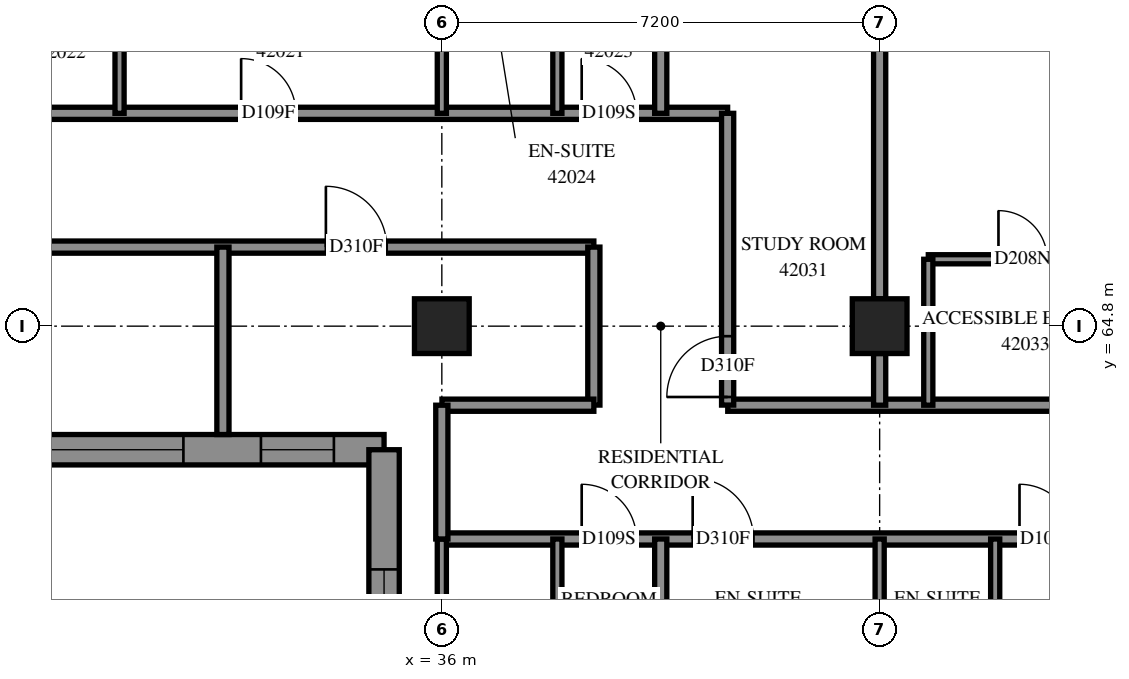
"""IFC4 building model, lengths in metres.
Left out: names, types, materials, properties, quantities, classifications, styles, units other than length and angle.
Written with IfcOpenShell. Run it as: python <this file> out.ifc"""

import sys

from ifc_helpers import new_model, si_unit, direction, frame, frame_2d, origin, origin_2d, place, context, subcontext, project, spatial, polyline, rectangle, outline, extrude, element, fill, save


model = new_model("IFC4")
c1 = context("Model", 3, precision=1e-05, world=origin(), true_north=direction((0.0, 1.0)))
c2 = subcontext(c1, "Body", "Model", "MODEL_VIEW")
j1 = project(units=[si_unit("LENGTHUNIT", "METRE"), si_unit("PLANEANGLEUNIT", "RADIAN")], contexts=[c1])
p1 = place(None, origin())
s1 = spatial("IfcSite", under=j1, at=p1, CompositionType="ELEMENT")
p2 = place(p1, origin())
s2 = spatial("IfcBuilding", under=s1, at=p2, CompositionType="ELEMENT")
p3 = place(p2, frame((0.0, 0.0, 155.8)))
s3 = spatial("IfcBuildingStorey", under=s2, at=p3, CompositionType="ELEMENT", Elevation=155.8)
for number, where, z_axis, x_axis in (
    (1, (36.0, 64.8, 0.0), (0.0, 0.0, 1.0), (1.0, 0.0, 0.0)),
    (2, (43.2, 64.8, 0.0), (0.0, 0.0, 1.0), (1.0, 0.0, 0.0)),
):
    element("IfcColumn", number, at=place(p3, frame(where, z_axis=z_axis, x_axis=x_axis)), inside=s3, PredefinedType="COLUMN", context=c2, shape_type="SweptSolid", body=[
        extrude(rectangle(XDim=0.9, YDim=0.9, at=origin_2d()), origin(), (0.0, 0.0, 1.0), 3.1),
    ])
p4 = place(p3, frame((19.568, 62.768, 0.0), z_axis=(0.0, 0.0, 1.0), x_axis=(1.0, 0.0, 0.0)))
e3 = element("IfcWall", 3, at=p4, inside=s3, PredefinedType="SOLIDWALL", context=c2, shape_type="SweptSolid", body=[
    extrude(outline(polyline([(-0.25, -0.25), (15.232, -0.25), (15.732, 0.25), (0.25, 0.25), (-0.25, -0.25)])), origin(), (0.0, 0.0, 1.0), 3.1),
])
p5 = place(p4, frame((2.432, 0.0, 0.45)))
e4 = element("IfcOpeningElement", 4, at=p5, cuts=e3, PredefinedType="OPENING", context=c2, shape_type="SweptSolid", body=[
    extrude(rectangle(XDim=2.8, YDim=2.5, at=frame_2d((1.4, 1.25))), frame((0.0, 0.26, 0.0), z_axis=(0.0, -1.0, 0.0), x_axis=(1.0, 0.0, 0.0)), (0.0, 0.0, 1.0), 0.52),
])
p6 = place(p4, frame((6.032, 0.0, 0.45)))
e5 = element("IfcOpeningElement", 5, at=p6, cuts=e3, PredefinedType="OPENING", context=c2, shape_type="SweptSolid", body=[
    extrude(rectangle(XDim=2.8, YDim=2.5, at=frame_2d((1.4, 1.25))), frame((0.0, 0.26, 0.0), z_axis=(0.0, -1.0, 0.0), x_axis=(1.0, 0.0, 0.0)), (0.0, 0.0, 1.0), 0.52),
])
p7 = place(p4, frame((9.382, 0.0, 0.45)))
e6 = element("IfcOpeningElement", 6, at=p7, cuts=e3, PredefinedType="OPENING", context=c2, shape_type="SweptSolid", body=[
    extrude(rectangle(XDim=2.8, YDim=2.5, at=frame_2d((1.4, 1.25))), frame((0.0, 0.26, 0.0), z_axis=(0.0, -1.0, 0.0), x_axis=(1.0, 0.0, 0.0)), (0.0, 0.0, 1.0), 0.52),
])
p8 = place(p4, frame((0.641, 0.0, 0.45)))
e7 = element("IfcOpeningElement", 7, at=p8, cuts=e3, PredefinedType="OPENING", context=c2, shape_type="SweptSolid", body=[
    extrude(rectangle(XDim=1.2, YDim=2.5, at=frame_2d((0.6, 1.25))), frame((0.0, 0.26, 0.0), z_axis=(0.0, -1.0, 0.0), x_axis=(1.0, 0.0, 0.0)), (0.0, 0.0, 1.0), 0.52),
])
p9 = place(p4, frame((13.457, 0.0, 0.45)))
e8 = element("IfcOpeningElement", 8, at=p9, cuts=e3, PredefinedType="OPENING", context=c2, shape_type="SweptSolid", body=[
    extrude(rectangle(XDim=1.2, YDim=2.5, at=frame_2d((0.6, 1.25))), frame((0.0, 0.26, 0.0), z_axis=(0.0, -1.0, 0.0), x_axis=(1.0, 0.0, 0.0)), (0.0, 0.0, 1.0), 0.52),
])
p10 = place(p3, frame((35.05, 62.768, 0.0), z_axis=(0.0, 0.0, 1.0), x_axis=(0.0, -1.0, 0.0)))
e9 = element("IfcWall", 9, at=p10, inside=s3, PredefinedType="SOLIDWALL", context=c2, shape_type="SweptSolid", body=[
    extrude(outline(polyline([(0.25, -0.25), (6.368, -0.25), (5.868, 0.25), (-0.25, 0.25), (0.25, -0.25)])), origin(), (0.0, 0.0, 1.0), 3.1),
])
p11 = place(p10, frame((1.968, 0.0, 0.7)))
e10 = element("IfcOpeningElement", 10, at=p11, cuts=e9, PredefinedType="OPENING", context=c2, shape_type="SweptSolid", body=[
    extrude(rectangle(XDim=1.8, YDim=2.2, at=frame_2d((0.9, 1.1))), frame((0.0, 0.26, 0.0), z_axis=(0.0, -1.0, 0.0), x_axis=(1.0, 0.0, 0.0)), (0.0, 0.0, 1.0), 0.52),
])
p12 = place(p10, frame((3.968, 0.0, 0.45)))
e11 = element("IfcOpeningElement", 11, at=p12, cuts=e9, PredefinedType="OPENING", context=c2, shape_type="SweptSolid", body=[
    extrude(rectangle(XDim=0.8, YDim=2.5, at=frame_2d((0.4, 1.25))), frame((0.0, 0.26, 0.0), z_axis=(0.0, -1.0, 0.0), x_axis=(1.0, 0.0, 0.0)), (0.0, 0.0, 1.0), 0.52),
])
p13 = place(p3, frame((21.6, 68.3, 0.0), z_axis=(0.0, 0.0, 1.0), x_axis=(1.0, 0.0, 0.0)))
e12 = element("IfcWall", 12, at=p13, inside=s3, PredefinedType="PARTITIONING", context=c2, shape_type="SweptSolid", body=[
    extrude(rectangle(XDim=19.1, YDim=0.2, at=frame_2d((9.55, 0.0))), origin(), (0.0, 0.0, 1.0), 3.1),
])
p14 = place(p13, frame((3.899, 0.0, 0.0)))
e13 = element("IfcOpeningElement", 13, at=p14, cuts=e12, PredefinedType="OPENING", context=c2, shape_type="SweptSolid", body=[
    extrude(rectangle(XDim=0.9, YDim=2.1, at=frame_2d((0.45, 1.05))), frame((0.0, 0.11, 0.0), z_axis=(0.0, -1.0, 0.0), x_axis=(1.0, 0.0, 0.0)), (0.0, 0.0, 1.0), 0.22),
])
p15 = place(p13, frame((11.099, 0.0, 0.0)))
e14 = element("IfcOpeningElement", 14, at=p15, cuts=e12, PredefinedType="OPENING", context=c2, shape_type="SweptSolid", body=[
    extrude(rectangle(XDim=0.9, YDim=2.1, at=frame_2d((0.45, 1.05))), frame((0.0, 0.11, 0.0), z_axis=(0.0, -1.0, 0.0), x_axis=(1.0, 0.0, 0.0)), (0.0, 0.0, 1.0), 0.22),
])
p16 = place(p13, frame((16.7, 0.0, 0.0)))
e15 = element("IfcOpeningElement", 15, at=p16, cuts=e12, PredefinedType="OPENING", context=c2, shape_type="SweptSolid", body=[
    extrude(rectangle(XDim=0.9, YDim=2.1, at=frame_2d((0.45, 1.05))), frame((0.0, 0.11, 0.0), z_axis=(0.0, -1.0, 0.0), x_axis=(1.0, 0.0, 0.0)), (0.0, 0.0, 1.0), 0.22),
])
p17 = place(p3, frame((21.6, 66.1, 0.0), z_axis=(0.0, 0.0, 1.0), x_axis=(1.0, 0.0, 0.0)))
e16 = element("IfcWall", 16, at=p17, inside=s3, PredefinedType="PARTITIONING", context=c2, shape_type="SweptSolid", body=[
    extrude(rectangle(XDim=16.9, YDim=0.2, at=frame_2d((8.45, 0.0))), origin(), (0.0, 0.0, 1.0), 3.1),
])
p18 = place(p17, frame((12.493, 0.0, 0.0)))
e17 = element("IfcOpeningElement", 17, at=p18, cuts=e16, PredefinedType="OPENING", context=c2, shape_type="SweptSolid", body=[
    extrude(rectangle(XDim=1.0, YDim=2.1, at=frame_2d((0.5, 1.05))), frame((0.0, 0.11, 0.0), z_axis=(0.0, -1.0, 0.0), x_axis=(1.0, 0.0, 0.0)), (0.0, 0.0, 1.0), 0.22),
])
p19 = place(p3, frame((36.0, 61.3, 0.0), z_axis=(0.0, 0.0, 1.0), x_axis=(1.0, 0.0, 0.0)))
e18 = element("IfcWall", 18, at=p19, inside=s3, PredefinedType="PARTITIONING", context=c2, shape_type="SweptSolid", body=[
    extrude(rectangle(XDim=16.9, YDim=0.2, at=frame_2d((8.45, 0.0))), origin(), (0.0, 0.0, 1.0), 3.1),
])
p20 = place(p19, frame((2.3, 0.0, 0.0)))
e19 = element("IfcOpeningElement", 19, at=p20, cuts=e18, PredefinedType="OPENING", context=c2, shape_type="SweptSolid", body=[
    extrude(rectangle(XDim=0.9, YDim=2.1, at=frame_2d((0.45, 1.05))), frame((0.0, 0.11, 0.0), z_axis=(0.0, -1.0, 0.0), x_axis=(1.0, 0.0, 0.0)), (0.0, 0.0, 1.0), 0.22),
])
p21 = place(p19, frame((4.125, 0.0, 0.0)))
e20 = element("IfcOpeningElement", 20, at=p21, cuts=e18, PredefinedType="OPENING", context=c2, shape_type="SweptSolid", body=[
    extrude(rectangle(XDim=1.0, YDim=2.1, at=frame_2d((0.5, 1.05))), frame((0.0, 0.11, 0.0), z_axis=(0.0, -1.0, 0.0), x_axis=(1.0, 0.0, 0.0)), (0.0, 0.0, 1.0), 0.22),
])
p22 = place(p19, frame((9.5, 0.0, 0.0)))
e21 = element("IfcOpeningElement", 21, at=p22, cuts=e18, PredefinedType="OPENING", context=c2, shape_type="SweptSolid", body=[
    extrude(rectangle(XDim=0.9, YDim=2.1, at=frame_2d((0.45, 1.05))), frame((0.0, 0.11, 0.0), z_axis=(0.0, -1.0, 0.0), x_axis=(1.0, 0.0, 0.0)), (0.0, 0.0, 1.0), 0.22),
])
p23 = place(p19, frame((11.325, 0.0, 0.0)))
e22 = element("IfcOpeningElement", 22, at=p23, cuts=e18, PredefinedType="OPENING", context=c2, shape_type="SweptSolid", body=[
    extrude(rectangle(XDim=1.0, YDim=2.1, at=frame_2d((0.5, 1.05))), frame((0.0, 0.11, 0.0), z_axis=(0.0, -1.0, 0.0), x_axis=(1.0, 0.0, 0.0)), (0.0, 0.0, 1.0), 0.22),
])
p24 = place(p19, frame((15.647, 0.0, 0.0)))
e23 = element("IfcOpeningElement", 23, at=p24, cuts=e18, PredefinedType="OPENING", context=c2, shape_type="SweptSolid", body=[
    extrude(rectangle(XDim=1.0, YDim=2.1, at=frame_2d((0.5, 1.05))), frame((0.0, 0.11, 0.0), z_axis=(0.0, -1.0, 0.0), x_axis=(1.0, 0.0, 0.0)), (0.0, 0.0, 1.0), 0.22),
])
p25 = place(p3, frame((40.702, 63.5, 0.0), z_axis=(0.0, 0.0, 1.0), x_axis=(1.0, 0.0, 0.0)))
e24 = element("IfcWall", 24, at=p25, inside=s3, PredefinedType="PARTITIONING", context=c2, shape_type="SweptSolid", body=[
    extrude(rectangle(XDim=14.198, YDim=0.2, at=frame_2d((7.099, 0.0))), origin(), (0.0, 0.0, 1.0), 3.1),
])
p26 = place(p25, frame((6.692, 0.0, 0.0)))
e25 = element("IfcOpeningElement", 25, at=p26, cuts=e24, PredefinedType="OPENING", context=c2, shape_type="SweptSolid", body=[
    extrude(rectangle(XDim=0.9, YDim=2.1, at=frame_2d((0.45, 1.05))), frame((0.0, 0.11, 0.0), z_axis=(0.0, -1.0, 0.0), x_axis=(1.0, 0.0, 0.0)), (0.0, 0.0, 1.0), 0.22),
])
p27 = place(p25, frame((10.25, 0.0, 0.0)))
e26 = element("IfcOpeningElement", 26, at=p27, cuts=e24, PredefinedType="OPENING", context=c2, shape_type="SweptSolid", body=[
    extrude(rectangle(XDim=0.9, YDim=2.1, at=frame_2d((0.45, 1.05))), frame((0.0, 0.11, 0.0), z_axis=(0.0, -1.0, 0.0), x_axis=(1.0, 0.0, 0.0)), (0.0, 0.0, 1.0), 0.22),
])
p28 = place(p3, frame((43.2, 65.25, 0.0), z_axis=(0.0, 0.0, 1.0), x_axis=(0.0, 1.0, 0.0)))
e27 = element("IfcWall", 27, at=p28, inside=s3, PredefinedType="PARTITIONING", context=c2, shape_type="SweptSolid", body=[
    extrude(rectangle(XDim=6.3, YDim=0.2, at=frame_2d((3.15, 0.0))), origin(), (0.0, 0.0, 1.0), 3.1),
])
p29 = place(p3, frame((40.7, 63.502, 0.0), z_axis=(0.0, 0.0, 1.0), x_axis=(0.0, 1.0, 0.0)))
e28 = element("IfcWall", 28, at=p29, inside=s3, PredefinedType="PARTITIONING", context=c2, shape_type="SweptSolid", body=[
    extrude(rectangle(XDim=4.798, YDim=0.2, at=frame_2d((2.399, 0.0))), origin(), (0.0, 0.0, 1.0), 3.1),
])
p30 = place(p29, frame((0.133, 0.0, 0.0)))
e29 = element("IfcOpeningElement", 29, at=p30, cuts=e28, PredefinedType="OPENING", context=c2, shape_type="SweptSolid", body=[
    extrude(rectangle(XDim=1.0, YDim=2.1, at=frame_2d((0.5, 1.05))), frame((0.0, 0.11, 0.0), z_axis=(0.0, -1.0, 0.0), x_axis=(1.0, 0.0, 0.0)), (0.0, 0.0, 1.0), 0.22),
])
p31 = place(p3, frame((39.6, 68.3, 0.0), z_axis=(0.0, 0.0, 1.0), x_axis=(0.0, 1.0, 0.0)))
e30 = element("IfcWall", 30, at=p31, inside=s3, PredefinedType="PARTITIONING", context=c2, shape_type="SweptSolid", body=[
    extrude(rectangle(XDim=4.558, YDim=0.2, at=frame_2d((2.279, 0.0))), origin(), (0.0, 0.0, 1.0), 3.1),
])
p32 = place(p3, frame((39.6, 56.9, 0.0), z_axis=(0.0, 0.0, 1.0), x_axis=(0.0, 1.0, 0.0)))
e31 = element("IfcWall", 31, at=p32, inside=s3, PredefinedType="PARTITIONING", context=c2, shape_type="SweptSolid", body=[
    extrude(rectangle(XDim=4.4, YDim=0.2, at=frame_2d((2.2, 0.0))), origin(), (0.0, 0.0, 1.0), 3.1),
])
p33 = place(p3, frame((44.0, 65.9, 0.0), z_axis=(0.0, 0.0, 1.0), x_axis=(1.0, 0.0, 0.0)))
e32 = element("IfcWall", 32, at=p33, inside=s3, PredefinedType="PARTITIONING", context=c2, shape_type="SweptSolid", body=[
    extrude(rectangle(XDim=3.2, YDim=0.15, at=frame_2d((1.6, 0.0))), origin(), (0.0, 0.0, 1.0), 3.1),
])
p34 = place(p33, frame((1.154, 0.0, 0.0)))
e33 = element("IfcOpeningElement", 33, at=p34, cuts=e32, PredefinedType="OPENING", context=c2, shape_type="SweptSolid", body=[
    extrude(rectangle(XDim=0.8, YDim=2.1, at=frame_2d((0.4, 1.05))), frame((0.0, 0.085, 0.0), z_axis=(0.0, -1.0, 0.0), x_axis=(1.0, 0.0, 0.0)), (0.0, 0.0, 1.0), 0.17),
])
p35 = place(p3, frame((32.4, 63.018, 0.0), z_axis=(0.0, 0.0, 1.0), x_axis=(0.0, 1.0, 0.0)))
e34 = element("IfcWall", 34, at=p35, inside=s3, PredefinedType="PARTITIONING", context=c2, shape_type="SweptSolid", body=[
    extrude(rectangle(XDim=3.082, YDim=0.2, at=frame_2d((1.541, 0.0))), origin(), (0.0, 0.0, 1.0), 3.1),
])
p36 = place(p3, frame((38.5, 63.502, 0.0), z_axis=(0.0, 0.0, 1.0), x_axis=(0.0, 1.0, 0.0)))
e35 = element("IfcWall", 35, at=p36, inside=s3, PredefinedType="PARTITIONING", context=c2, shape_type="SweptSolid", body=[
    extrude(rectangle(XDim=2.598, YDim=0.2, at=frame_2d((1.299, 0.0))), origin(), (0.0, 0.0, 1.0), 3.1),
])
p37 = place(p3, frame((36.002, 63.5, 0.0), z_axis=(0.0, 0.0, 1.0), x_axis=(1.0, 0.0, 0.0)))
e36 = element("IfcWall", 36, at=p37, inside=s3, PredefinedType="PARTITIONING", context=c2, shape_type="SweptSolid", body=[
    extrude(rectangle(XDim=2.498, YDim=0.2, at=frame_2d((1.249, 0.0))), origin(), (0.0, 0.0, 1.0), 3.1),
])
for number, where, z_axis, x_axis in (
    (37, (30.7, 68.3, 0.0), (0.0, 0.0, 1.0), (0.0, 1.0, 0.0)),
    (38, (37.9, 68.3, 0.0), (0.0, 0.0, 1.0), (0.0, 1.0, 0.0)),
    (39, (36.0, 68.3, 0.0), (0.0, 0.0, 1.0), (0.0, 1.0, 0.0)),
    (40, (44.0, 63.5, 0.0), (0.0, 0.0, 1.0), (0.0, 1.0, 0.0)),
    (41, (37.9, 58.9, 0.0), (0.0, 0.0, 1.0), (0.0, 1.0, 0.0)),
):
    element("IfcWall", number, at=place(p3, frame(where, z_axis=z_axis, x_axis=x_axis)), inside=s3, PredefinedType="PARTITIONING", context=c2, shape_type="SweptSolid", body=[
        extrude(rectangle(XDim=2.4, YDim=0.15, at=frame_2d((1.2, 0.0))), origin(), (0.0, 0.0, 1.0), 3.1),
    ])
p38 = place(p3, frame((36.0, 58.9, 0.0), z_axis=(0.0, 0.0, 1.0), x_axis=(0.0, 1.0, 0.0)))
e42 = element("IfcWall", 42, at=p38, inside=s3, PredefinedType="PARTITIONING", context=c2, shape_type="SweptSolid", body=[
    extrude(rectangle(XDim=2.4, YDim=0.15, at=frame_2d((1.2, 0.0))), origin(), (0.0, 0.0, 1.0), 2.6),
])
for number, where, z_axis, x_axis in (
    (43, (45.1, 58.9, 0.0), (0.0, 0.0, 1.0), (0.0, 1.0, 0.0)),
    (44, (43.2, 58.9, 0.0), (0.0, 0.0, 1.0), (0.0, 1.0, 0.0)),
):
    element("IfcWall", number, at=place(p3, frame(where, z_axis=z_axis, x_axis=x_axis)), inside=s3, PredefinedType="PARTITIONING", context=c2, shape_type="SweptSolid", body=[
        extrude(rectangle(XDim=2.4, YDim=0.15, at=frame_2d((1.2, 0.0))), origin(), (0.0, 0.0, 1.0), 3.1),
    ])
p39 = place(p3, frame((36.0, 61.3, 0.0), z_axis=(0.0, 0.0, 1.0), x_axis=(0.0, 1.0, 0.0)))
e45 = element("IfcWall", 45, at=p39, inside=s3, PredefinedType="PARTITIONING", context=c2, shape_type="SweptSolid", body=[
    extrude(rectangle(XDim=2.2, YDim=0.2, at=frame_2d((1.1, 0.0))), origin(), (0.0, 0.0, 1.0), 2.6),
])
p40 = place(p3, frame((43.2, 63.5, 0.0), z_axis=(0.0, 0.0, 1.0), x_axis=(0.0, 1.0, 0.0)))
e46 = element("IfcWall", 46, at=p40, inside=s3, PredefinedType="PARTITIONING", context=c2, shape_type="SweptSolid", body=[
    extrude(rectangle(XDim=0.85, YDim=0.2, at=frame_2d((0.425, 0.0))), origin(), (0.0, 0.0, 1.0), 3.1),
])
p41 = place(p7, origin())
e47 = element("IfcWindow", 47, at=p41, inside=s3, PartitioningType="SINGLE_PANEL", PredefinedType="WINDOW", context=c2, shape_type="SweptSolid", body=[
    extrude(rectangle(XDim=2.8, YDim=2.5, at=frame_2d((1.4, 1.25))), frame((0.0, 0.18, 0.0), z_axis=(0.0, -1.0, 0.0), x_axis=(1.0, 0.0, 0.0)), (0.0, 0.0, 1.0), 0.06),
])
fill(e6, e47)
p42 = place(p9, origin())
e48 = element("IfcWindow", 48, at=p42, inside=s3, PartitioningType="SINGLE_PANEL", PredefinedType="WINDOW", context=c2, shape_type="SweptSolid", body=[
    extrude(rectangle(XDim=1.2, YDim=2.5, at=frame_2d((0.6, 1.25))), frame((0.0, 0.18, 0.0), z_axis=(0.0, -1.0, 0.0), x_axis=(1.0, 0.0, 0.0)), (0.0, 0.0, 1.0), 0.06),
])
fill(e8, e48)
p43 = place(p15, origin())
e49 = element("IfcDoor", 49, at=p43, inside=s3, OperationType="SINGLE_SWING_RIGHT", PredefinedType="DOOR", context=c2, shape_type="SweptSolid", body=[
    extrude(rectangle(XDim=0.9, YDim=2.1, at=frame_2d((0.45, 1.05))), frame((0.0, 0.025, 0.0), z_axis=(0.0, -1.0, 0.0), x_axis=(1.0, 0.0, 0.0)), (0.0, 0.0, 1.0), 0.05),
])
fill(e14, e49)
p44 = place(p16, origin())
e50 = element("IfcDoor", 50, at=p44, inside=s3, OperationType="SINGLE_SWING_RIGHT", PredefinedType="DOOR", context=c2, shape_type="SweptSolid", body=[
    extrude(rectangle(XDim=0.9, YDim=2.1, at=frame_2d((0.45, 1.05))), frame((0.0, 0.025, 0.0), z_axis=(0.0, -1.0, 0.0), x_axis=(1.0, 0.0, 0.0)), (0.0, 0.0, 1.0), 0.05),
])
fill(e15, e50)
p45 = place(p18, origin())
e51 = element("IfcDoor", 51, at=p45, inside=s3, OperationType="SINGLE_SWING_RIGHT", PredefinedType="DOOR", context=c2, shape_type="SweptSolid", body=[
    extrude(rectangle(XDim=1.0, YDim=2.1, at=frame_2d((0.5, 1.05))), frame((0.0, 0.025, 0.0), z_axis=(0.0, -1.0, 0.0), x_axis=(1.0, 0.0, 0.0)), (0.0, 0.0, 1.0), 0.05),
])
fill(e17, e51)
p46 = place(p20, origin())
e52 = element("IfcDoor", 52, at=p46, inside=s3, OperationType="SINGLE_SWING_LEFT", PredefinedType="DOOR", context=c2, shape_type="SweptSolid", body=[
    extrude(rectangle(XDim=0.9, YDim=2.1, at=frame_2d((0.45, 1.05))), frame((0.0, 0.025, 0.0), z_axis=(0.0, -1.0, 0.0), x_axis=(1.0, 0.0, 0.0)), (0.0, 0.0, 1.0), 0.05),
])
fill(e19, e52)
p47 = place(p21, origin())
e53 = element("IfcDoor", 53, at=p47, inside=s3, OperationType="SINGLE_SWING_RIGHT", PredefinedType="DOOR", context=c2, shape_type="SweptSolid", body=[
    extrude(rectangle(XDim=1.0, YDim=2.1, at=frame_2d((0.5, 1.05))), frame((0.0, 0.025, 0.0), z_axis=(0.0, -1.0, 0.0), x_axis=(1.0, 0.0, 0.0)), (0.0, 0.0, 1.0), 0.05),
])
fill(e20, e53)
p48 = place(p22, origin())
e54 = element("IfcDoor", 54, at=p48, inside=s3, OperationType="SINGLE_SWING_LEFT", PredefinedType="DOOR", context=c2, shape_type="SweptSolid", body=[
    extrude(rectangle(XDim=0.9, YDim=2.1, at=frame_2d((0.45, 1.05))), frame((0.0, 0.025, 0.0), z_axis=(0.0, -1.0, 0.0), x_axis=(1.0, 0.0, 0.0)), (0.0, 0.0, 1.0), 0.05),
])
fill(e21, e54)
p49 = place(p30, origin())
e55 = element("IfcDoor", 55, at=p49, inside=s3, OperationType="SINGLE_SWING_LEFT", PredefinedType="DOOR", context=c2, shape_type="SweptSolid", body=[
    extrude(rectangle(XDim=1.0, YDim=2.1, at=frame_2d((0.5, 1.05))), frame((0.0, 0.025, 0.0), z_axis=(0.0, -1.0, 0.0), x_axis=(1.0, 0.0, 0.0)), (0.0, 0.0, 1.0), 0.05),
])
fill(e29, e55)
p50 = place(p34, origin())
e56 = element("IfcDoor", 56, at=p50, inside=s3, OperationType="SINGLE_SWING_RIGHT", PredefinedType="DOOR", context=c2, shape_type="SweptSolid", body=[
    extrude(rectangle(XDim=0.8, YDim=2.1, at=frame_2d((0.4, 1.05))), frame((0.0, 0.025, 0.0), z_axis=(0.0, -1.0, 0.0), x_axis=(1.0, 0.0, 0.0)), (0.0, 0.0, 1.0), 0.05),
])
fill(e33, e56)
p51 = place(p11, origin())
e57 = element("IfcWindow", 57, at=p51, inside=s3, PartitioningType="SINGLE_PANEL", PredefinedType="WINDOW", context=c2, shape_type="SweptSolid", body=[
    extrude(rectangle(XDim=1.8, YDim=2.2, at=frame_2d((0.9, 1.1))), frame((0.0, 0.18, 0.0), z_axis=(0.0, -1.0, 0.0), x_axis=(1.0, 0.0, 0.0)), (0.0, 0.0, 1.0), 0.06),
])
fill(e10, e57)
save(model, sys.argv[1])
